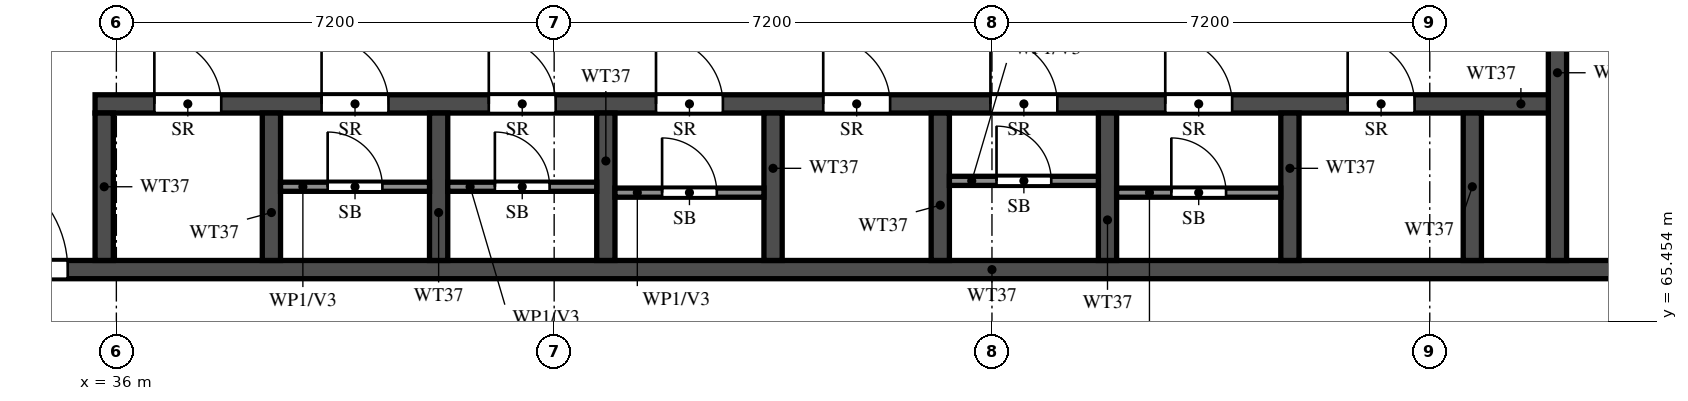
"""IFC4 building model, lengths in metres.
Left out: names, types, materials, properties, quantities, classifications, styles, units other than length and angle.
Written with IfcOpenShell. Run it as: python <this file> out.ifc"""

import sys

from ifc_helpers import new_model, si_unit, direction, frame, frame_2d, origin, place, context, subcontext, project, spatial, rectangle, extrude, element, fill, save


model = new_model("IFC4")
c1 = context("Model", 3, precision=1e-05, world=origin(), true_north=direction((0.0, 1.0)))
c2 = subcontext(c1, "Body", "Model", "MODEL_VIEW")
j1 = project(units=[si_unit("LENGTHUNIT", "METRE"), si_unit("PLANEANGLEUNIT", "RADIAN")], contexts=[c1])
p1 = place(None, origin())
s1 = spatial("IfcSite", under=j1, at=p1, CompositionType="ELEMENT")
p2 = place(p1, origin())
s2 = spatial("IfcBuilding", under=s1, at=p2, CompositionType="ELEMENT")
p3 = place(p2, frame((0.0, 0.0, 211.5)))
s3 = spatial("IfcBuildingStorey", under=s2, at=p3, CompositionType="ELEMENT", Elevation=211.5)
p4 = place(p3, frame((29.2, 66.3, 0.0), z_axis=(0.0, 0.0, 1.0), x_axis=(1.0, 0.0, 0.0)))
e1 = element("IfcWall", 1, at=p4, inside=s3, PredefinedType="SHEAR", context=c2, shape_type="SweptSolid", body=[
    extrude(rectangle(XDim=42.4, YDim=0.3, at=frame_2d((21.2, 0.0))), origin(), (0.0, 0.0, 1.0), 3.22),
])
p5 = place(p4, frame((1.425, 0.0, 0.0)))
e2 = element("IfcOpeningElement", 2, at=p5, cuts=e1, PredefinedType="OPENING", context=c2, shape_type="SweptSolid", body=[
    extrude(rectangle(XDim=1.1, YDim=2.1, at=frame_2d((0.55, 1.05))), frame((0.0, 0.16, 0.0), z_axis=(0.0, -1.0, 0.0), x_axis=(1.0, 0.0, 0.0)), (0.0, 0.0, 1.0), 0.32),
])
p6 = place(p4, frame((4.2, 0.0, 0.0)))
e3 = element("IfcOpeningElement", 3, at=p6, cuts=e1, PredefinedType="OPENING", context=c2, shape_type="SweptSolid", body=[
    extrude(rectangle(XDim=1.8, YDim=2.1, at=frame_2d((0.9, 1.05))), frame((0.0, 0.16, 0.0), z_axis=(0.0, -1.0, 0.0), x_axis=(1.0, 0.0, 0.0)), (0.0, 0.0, 1.0), 0.32),
])
p7 = place(p3, frame((35.65, 69.025, 0.0), z_axis=(0.0, 0.0, 1.0), x_axis=(1.0, 0.0, 0.0)))
e4 = element("IfcWall", 4, at=p7, inside=s3, PredefinedType="SHEAR", context=c2, shape_type="SweptSolid", body=[
    extrude(rectangle(XDim=24.05, YDim=0.3, at=frame_2d((12.025, 0.0))), origin(), (0.0, 0.0, 1.0), 3.22),
])
p8 = place(p7, frame((0.975, 0.0, 0.0)))
e5 = element("IfcOpeningElement", 5, at=p8, cuts=e4, PredefinedType="OPENING", context=c2, shape_type="SweptSolid", body=[
    extrude(rectangle(XDim=1.1, YDim=2.1, at=frame_2d((0.55, 1.05))), frame((0.0, 0.16, 0.0), z_axis=(0.0, -1.0, 0.0), x_axis=(1.0, 0.0, 0.0)), (0.0, 0.0, 1.0), 0.32),
])
p9 = place(p7, frame((3.725, 0.0, 0.0)))
e6 = element("IfcOpeningElement", 6, at=p9, cuts=e4, PredefinedType="OPENING", context=c2, shape_type="SweptSolid", body=[
    extrude(rectangle(XDim=1.1, YDim=2.1, at=frame_2d((0.55, 1.05))), frame((0.0, 0.16, 0.0), z_axis=(0.0, -1.0, 0.0), x_axis=(1.0, 0.0, 0.0)), (0.0, 0.0, 1.0), 0.32),
])
p10 = place(p7, frame((6.475, 0.0, 0.0)))
e7 = element("IfcOpeningElement", 7, at=p10, cuts=e4, PredefinedType="OPENING", context=c2, shape_type="SweptSolid", body=[
    extrude(rectangle(XDim=1.1, YDim=2.1, at=frame_2d((0.55, 1.05))), frame((0.0, 0.16, 0.0), z_axis=(0.0, -1.0, 0.0), x_axis=(1.0, 0.0, 0.0)), (0.0, 0.0, 1.0), 0.32),
])
p11 = place(p7, frame((9.225, 0.0, 0.0)))
e8 = element("IfcOpeningElement", 8, at=p11, cuts=e4, PredefinedType="OPENING", context=c2, shape_type="SweptSolid", body=[
    extrude(rectangle(XDim=1.1, YDim=2.1, at=frame_2d((0.55, 1.05))), frame((0.0, 0.16, 0.0), z_axis=(0.0, -1.0, 0.0), x_axis=(1.0, 0.0, 0.0)), (0.0, 0.0, 1.0), 0.32),
])
p12 = place(p7, frame((11.975, 0.0, 0.0)))
e9 = element("IfcOpeningElement", 9, at=p12, cuts=e4, PredefinedType="OPENING", context=c2, shape_type="SweptSolid", body=[
    extrude(rectangle(XDim=1.1, YDim=2.1, at=frame_2d((0.55, 1.05))), frame((0.0, 0.16, 0.0), z_axis=(0.0, -1.0, 0.0), x_axis=(1.0, 0.0, 0.0)), (0.0, 0.0, 1.0), 0.32),
])
p13 = place(p7, frame((14.725, 0.0, 0.0)))
e10 = element("IfcOpeningElement", 10, at=p13, cuts=e4, PredefinedType="OPENING", context=c2, shape_type="SweptSolid", body=[
    extrude(rectangle(XDim=1.1, YDim=2.1, at=frame_2d((0.55, 1.05))), frame((0.0, 0.16, 0.0), z_axis=(0.0, -1.0, 0.0), x_axis=(1.0, 0.0, 0.0)), (0.0, 0.0, 1.0), 0.32),
])
p14 = place(p7, frame((17.6, 0.0, 0.0)))
e11 = element("IfcOpeningElement", 11, at=p14, cuts=e4, PredefinedType="OPENING", context=c2, shape_type="SweptSolid", body=[
    extrude(rectangle(XDim=1.1, YDim=2.1, at=frame_2d((0.55, 1.05))), frame((0.0, 0.16, 0.0), z_axis=(0.0, -1.0, 0.0), x_axis=(1.0, 0.0, 0.0)), (0.0, 0.0, 1.0), 0.32),
])
p15 = place(p7, frame((20.6, 0.0, 0.0)))
e12 = element("IfcOpeningElement", 12, at=p15, cuts=e4, PredefinedType="OPENING", context=c2, shape_type="SweptSolid", body=[
    extrude(rectangle(XDim=1.1, YDim=2.1, at=frame_2d((0.55, 1.05))), frame((0.0, 0.16, 0.0), z_axis=(0.0, -1.0, 0.0), x_axis=(1.0, 0.0, 0.0)), (0.0, 0.0, 1.0), 0.32),
])
p16 = place(p3, frame((59.7, 66.45, 0.0), z_axis=(0.0, 0.0, 1.0), x_axis=(0.0, 1.0, 0.0)))
e13 = element("IfcWall", 13, at=p16, inside=s3, PredefinedType="SHEAR", context=c2, shape_type="SweptSolid", body=[
    extrude(rectangle(XDim=6.175, YDim=0.3, at=frame_2d((3.087, 0.0))), origin(), (0.0, 0.0, 1.0), 3.22),
])
p17 = place(p16, frame((3.85, 0.0, 0.0)))
e14 = element("IfcOpeningElement", 14, at=p17, cuts=e13, PredefinedType="OPENING", context=c2, shape_type="SweptSolid", body=[
    extrude(rectangle(XDim=1.2, YDim=2.1, at=frame_2d((0.6, 1.05))), frame((0.0, 0.16, 0.0), z_axis=(0.0, -1.0, 0.0), x_axis=(1.0, 0.0, 0.0)), (0.0, 0.0, 1.0), 0.32),
])
for number, where, z_axis, x_axis in (
    (15, (35.8, 66.45, 0.0), (0.0, 0.0, 1.0), (0.0, 1.0, 0.0)),
    (16, (38.55, 66.45, 0.0), (0.0, 0.0, 1.0), (0.0, 1.0, 0.0)),
    (17, (41.3, 66.45, 0.0), (0.0, 0.0, 1.0), (0.0, 1.0, 0.0)),
    (18, (44.05, 66.45, 0.0), (0.0, 0.0, 1.0), (0.0, 1.0, 0.0)),
    (19, (46.8, 66.45, 0.0), (0.0, 0.0, 1.0), (0.0, 1.0, 0.0)),
    (20, (49.55, 66.45, 0.0), (0.0, 0.0, 1.0), (0.0, 1.0, 0.0)),
    (21, (52.3, 66.45, 0.0), (0.0, 0.0, 1.0), (0.0, 1.0, 0.0)),
    (22, (55.3, 66.45, 0.0), (0.0, 0.0, 1.0), (0.0, 1.0, 0.0)),
    (23, (58.3, 66.45, 0.0), (0.0, 0.0, 1.0), (0.0, 1.0, 0.0)),
):
    element("IfcWall", number, at=place(p3, frame(where, z_axis=z_axis, x_axis=x_axis)), inside=s3, PredefinedType="SHEAR", context=c2, shape_type="SweptSolid", body=[
        extrude(rectangle(XDim=2.425, YDim=0.3, at=frame_2d((1.212, 0.0))), origin(), (0.0, 0.0, 1.0), 3.22),
    ])
p18 = place(p3, frame((38.7, 67.663, 0.0), z_axis=(0.0, 0.0, 1.0), x_axis=(1.0, 0.0, 0.0)))
e24 = element("IfcWall", 24, at=p18, inside=s3, PredefinedType="PARTITIONING", context=c2, shape_type="SweptSolid", body=[
    extrude(rectangle(XDim=2.45, YDim=0.15, at=frame_2d((1.225, 0.0))), origin(), (0.0, 0.0, 1.0), 3.22),
])
p19 = place(p18, frame((0.775, 0.0, 0.0)))
e25 = element("IfcOpeningElement", 25, at=p19, cuts=e24, PredefinedType="OPENING", context=c2, shape_type="SweptSolid", body=[
    extrude(rectangle(XDim=0.9, YDim=2.1, at=frame_2d((0.45, 1.05))), frame((0.0, 0.085, 0.0), z_axis=(0.0, -1.0, 0.0), x_axis=(1.0, 0.0, 0.0)), (0.0, 0.0, 1.0), 0.17),
])
p20 = place(p3, frame((41.45, 67.663, 0.0), z_axis=(0.0, 0.0, 1.0), x_axis=(1.0, 0.0, 0.0)))
e26 = element("IfcWall", 26, at=p20, inside=s3, PredefinedType="PARTITIONING", context=c2, shape_type="SweptSolid", body=[
    extrude(rectangle(XDim=2.45, YDim=0.15, at=frame_2d((1.225, 0.0))), origin(), (0.0, 0.0, 1.0), 3.22),
])
p21 = place(p20, frame((0.775, 0.0, 0.0)))
e27 = element("IfcOpeningElement", 27, at=p21, cuts=e26, PredefinedType="OPENING", context=c2, shape_type="SweptSolid", body=[
    extrude(rectangle(XDim=0.9, YDim=2.1, at=frame_2d((0.45, 1.05))), frame((0.0, 0.085, 0.0), z_axis=(0.0, -1.0, 0.0), x_axis=(1.0, 0.0, 0.0)), (0.0, 0.0, 1.0), 0.17),
])
p22 = place(p3, frame((44.2, 67.565, 0.0), z_axis=(0.0, 0.0, 1.0), x_axis=(1.0, 0.0, 0.0)))
e28 = element("IfcWall", 28, at=p22, inside=s3, PredefinedType="PARTITIONING", context=c2, shape_type="SweptSolid", body=[
    extrude(rectangle(XDim=2.45, YDim=0.15, at=frame_2d((1.225, 0.0))), origin(), (0.0, 0.0, 1.0), 3.22),
])
p23 = place(p22, frame((0.775, 0.0, 0.0)))
e29 = element("IfcOpeningElement", 29, at=p23, cuts=e28, PredefinedType="OPENING", context=c2, shape_type="SweptSolid", body=[
    extrude(rectangle(XDim=0.9, YDim=2.1, at=frame_2d((0.45, 1.05))), frame((0.0, 0.085, 0.0), z_axis=(0.0, -1.0, 0.0), x_axis=(1.0, 0.0, 0.0)), (0.0, 0.0, 1.0), 0.17),
])
p24 = place(p3, frame((49.7, 67.76, 0.0), z_axis=(0.0, 0.0, 1.0), x_axis=(1.0, 0.0, 0.0)))
e30 = element("IfcWall", 30, at=p24, inside=s3, PredefinedType="PARTITIONING", context=c2, shape_type="SweptSolid", body=[
    extrude(rectangle(XDim=2.45, YDim=0.15, at=frame_2d((1.225, 0.0))), origin(), (0.0, 0.0, 1.0), 3.22),
])
p25 = place(p24, frame((0.775, 0.0, 0.0)))
e31 = element("IfcOpeningElement", 31, at=p25, cuts=e30, PredefinedType="OPENING", context=c2, shape_type="SweptSolid", body=[
    extrude(rectangle(XDim=0.9, YDim=2.1, at=frame_2d((0.45, 1.05))), frame((0.0, 0.085, 0.0), z_axis=(0.0, -1.0, 0.0), x_axis=(1.0, 0.0, 0.0)), (0.0, 0.0, 1.0), 0.17),
])
p26 = place(p3, frame((52.45, 67.565, 0.0), z_axis=(0.0, 0.0, 1.0), x_axis=(1.0, 0.0, 0.0)))
e32 = element("IfcWall", 32, at=p26, inside=s3, PredefinedType="PARTITIONING", context=c2, shape_type="SweptSolid", body=[
    extrude(rectangle(XDim=2.7, YDim=0.15, at=frame_2d((1.35, 0.0))), origin(), (0.0, 0.0, 1.0), 3.22),
])
p27 = place(p26, frame((0.9, 0.0, 0.0)))
e33 = element("IfcOpeningElement", 33, at=p27, cuts=e32, PredefinedType="OPENING", context=c2, shape_type="SweptSolid", body=[
    extrude(rectangle(XDim=0.9, YDim=2.1, at=frame_2d((0.45, 1.05))), frame((0.0, 0.085, 0.0), z_axis=(0.0, -1.0, 0.0), x_axis=(1.0, 0.0, 0.0)), (0.0, 0.0, 1.0), 0.17),
])
p28 = place(p6, origin())
e34 = element("IfcDoor", 34, at=p28, inside=s3, OperationType="DOUBLE_DOOR_SINGLE_SWING", PredefinedType="DOOR", context=c2, shape_type="SweptSolid", body=[
    extrude(rectangle(XDim=1.8, YDim=2.1, at=frame_2d((0.9, 1.05))), frame((0.0, 0.025, 0.0), z_axis=(0.0, -1.0, 0.0), x_axis=(1.0, 0.0, 0.0)), (0.0, 0.0, 1.0), 0.05),
])
fill(e3, e34)
p29 = place(p8, origin())
e35 = element("IfcDoor", 35, at=p29, inside=s3, OperationType="SINGLE_SWING_RIGHT", PredefinedType="DOOR", context=c2, shape_type="SweptSolid", body=[
    extrude(rectangle(XDim=1.1, YDim=2.1, at=frame_2d((0.55, 1.05))), frame((0.0, 0.025, 0.0), z_axis=(0.0, -1.0, 0.0), x_axis=(1.0, 0.0, 0.0)), (0.0, 0.0, 1.0), 0.05),
])
fill(e5, e35)
p30 = place(p9, origin())
e36 = element("IfcDoor", 36, at=p30, inside=s3, OperationType="SINGLE_SWING_LEFT", PredefinedType="DOOR", context=c2, shape_type="SweptSolid", body=[
    extrude(rectangle(XDim=1.1, YDim=2.1, at=frame_2d((0.55, 1.05))), frame((0.0, 0.025, 0.0), z_axis=(0.0, -1.0, 0.0), x_axis=(1.0, 0.0, 0.0)), (0.0, 0.0, 1.0), 0.05),
])
fill(e6, e36)
p31 = place(p19, origin())
e37 = element("IfcDoor", 37, at=p31, inside=s3, OperationType="SINGLE_SWING_LEFT", PredefinedType="DOOR", context=c2, shape_type="SweptSolid", body=[
    extrude(rectangle(XDim=0.9, YDim=2.1, at=frame_2d((0.45, 1.05))), frame((0.0, 0.025, 0.0), z_axis=(0.0, -1.0, 0.0), x_axis=(1.0, 0.0, 0.0)), (0.0, 0.0, 1.0), 0.05),
])
fill(e25, e37)
p32 = place(p10, origin())
e38 = element("IfcDoor", 38, at=p32, inside=s3, OperationType="SINGLE_SWING_RIGHT", PredefinedType="DOOR", context=c2, shape_type="SweptSolid", body=[
    extrude(rectangle(XDim=1.1, YDim=2.1, at=frame_2d((0.55, 1.05))), frame((0.0, 0.025, 0.0), z_axis=(0.0, -1.0, 0.0), x_axis=(1.0, 0.0, 0.0)), (0.0, 0.0, 1.0), 0.05),
])
fill(e7, e38)
p33 = place(p21, origin())
e39 = element("IfcDoor", 39, at=p33, inside=s3, OperationType="SINGLE_SWING_RIGHT", PredefinedType="DOOR", context=c2, shape_type="SweptSolid", body=[
    extrude(rectangle(XDim=0.9, YDim=2.1, at=frame_2d((0.45, 1.05))), frame((0.0, 0.025, 0.0), z_axis=(0.0, -1.0, 0.0), x_axis=(1.0, 0.0, 0.0)), (0.0, 0.0, 1.0), 0.05),
])
fill(e27, e39)
p34 = place(p11, origin())
e40 = element("IfcDoor", 40, at=p34, inside=s3, OperationType="SINGLE_SWING_LEFT", PredefinedType="DOOR", context=c2, shape_type="SweptSolid", body=[
    extrude(rectangle(XDim=1.1, YDim=2.1, at=frame_2d((0.55, 1.05))), frame((0.0, 0.025, 0.0), z_axis=(0.0, -1.0, 0.0), x_axis=(1.0, 0.0, 0.0)), (0.0, 0.0, 1.0), 0.05),
])
fill(e8, e40)
p35 = place(p23, origin())
e41 = element("IfcDoor", 41, at=p35, inside=s3, OperationType="SINGLE_SWING_LEFT", PredefinedType="DOOR", context=c2, shape_type="SweptSolid", body=[
    extrude(rectangle(XDim=0.9, YDim=2.1, at=frame_2d((0.45, 1.05))), frame((0.0, 0.025, 0.0), z_axis=(0.0, -1.0, 0.0), x_axis=(1.0, 0.0, 0.0)), (0.0, 0.0, 1.0), 0.05),
])
fill(e29, e41)
p36 = place(p12, origin())
e42 = element("IfcDoor", 42, at=p36, inside=s3, OperationType="SINGLE_SWING_RIGHT", PredefinedType="DOOR", context=c2, shape_type="SweptSolid", body=[
    extrude(rectangle(XDim=1.1, YDim=2.1, at=frame_2d((0.55, 1.05))), frame((0.0, 0.025, 0.0), z_axis=(0.0, -1.0, 0.0), x_axis=(1.0, 0.0, 0.0)), (0.0, 0.0, 1.0), 0.05),
])
fill(e9, e42)
p37 = place(p13, origin())
e43 = element("IfcDoor", 43, at=p37, inside=s3, OperationType="SINGLE_SWING_LEFT", PredefinedType="DOOR", context=c2, shape_type="SweptSolid", body=[
    extrude(rectangle(XDim=1.1, YDim=2.1, at=frame_2d((0.55, 1.05))), frame((0.0, 0.025, 0.0), z_axis=(0.0, -1.0, 0.0), x_axis=(1.0, 0.0, 0.0)), (0.0, 0.0, 1.0), 0.05),
])
fill(e10, e43)
p38 = place(p25, origin())
e44 = element("IfcDoor", 44, at=p38, inside=s3, OperationType="SINGLE_SWING_RIGHT", PredefinedType="DOOR", context=c2, shape_type="SweptSolid", body=[
    extrude(rectangle(XDim=0.9, YDim=2.1, at=frame_2d((0.45, 1.05))), frame((0.0, 0.025, 0.0), z_axis=(0.0, -1.0, 0.0), x_axis=(1.0, 0.0, 0.0)), (0.0, 0.0, 1.0), 0.05),
])
fill(e31, e44)
p39 = place(p14, origin())
e45 = element("IfcDoor", 45, at=p39, inside=s3, OperationType="SINGLE_SWING_RIGHT", PredefinedType="DOOR", context=c2, shape_type="SweptSolid", body=[
    extrude(rectangle(XDim=1.1, YDim=2.1, at=frame_2d((0.55, 1.05))), frame((0.0, 0.025, 0.0), z_axis=(0.0, -1.0, 0.0), x_axis=(1.0, 0.0, 0.0)), (0.0, 0.0, 1.0), 0.05),
])
fill(e11, e45)
p40 = place(p27, origin())
e46 = element("IfcDoor", 46, at=p40, inside=s3, OperationType="SINGLE_SWING_RIGHT", PredefinedType="DOOR", context=c2, shape_type="SweptSolid", body=[
    extrude(rectangle(XDim=0.9, YDim=2.1, at=frame_2d((0.45, 1.05))), frame((0.0, 0.025, 0.0), z_axis=(0.0, -1.0, 0.0), x_axis=(1.0, 0.0, 0.0)), (0.0, 0.0, 1.0), 0.05),
])
fill(e33, e46)
p41 = place(p15, origin())
e47 = element("IfcDoor", 47, at=p41, inside=s3, OperationType="SINGLE_SWING_RIGHT", PredefinedType="DOOR", context=c2, shape_type="SweptSolid", body=[
    extrude(rectangle(XDim=1.1, YDim=2.1, at=frame_2d((0.55, 1.05))), frame((0.0, 0.025, 0.0), z_axis=(0.0, -1.0, 0.0), x_axis=(1.0, 0.0, 0.0)), (0.0, 0.0, 1.0), 0.05),
])
fill(e12, e47)
save(model, sys.argv[1])
